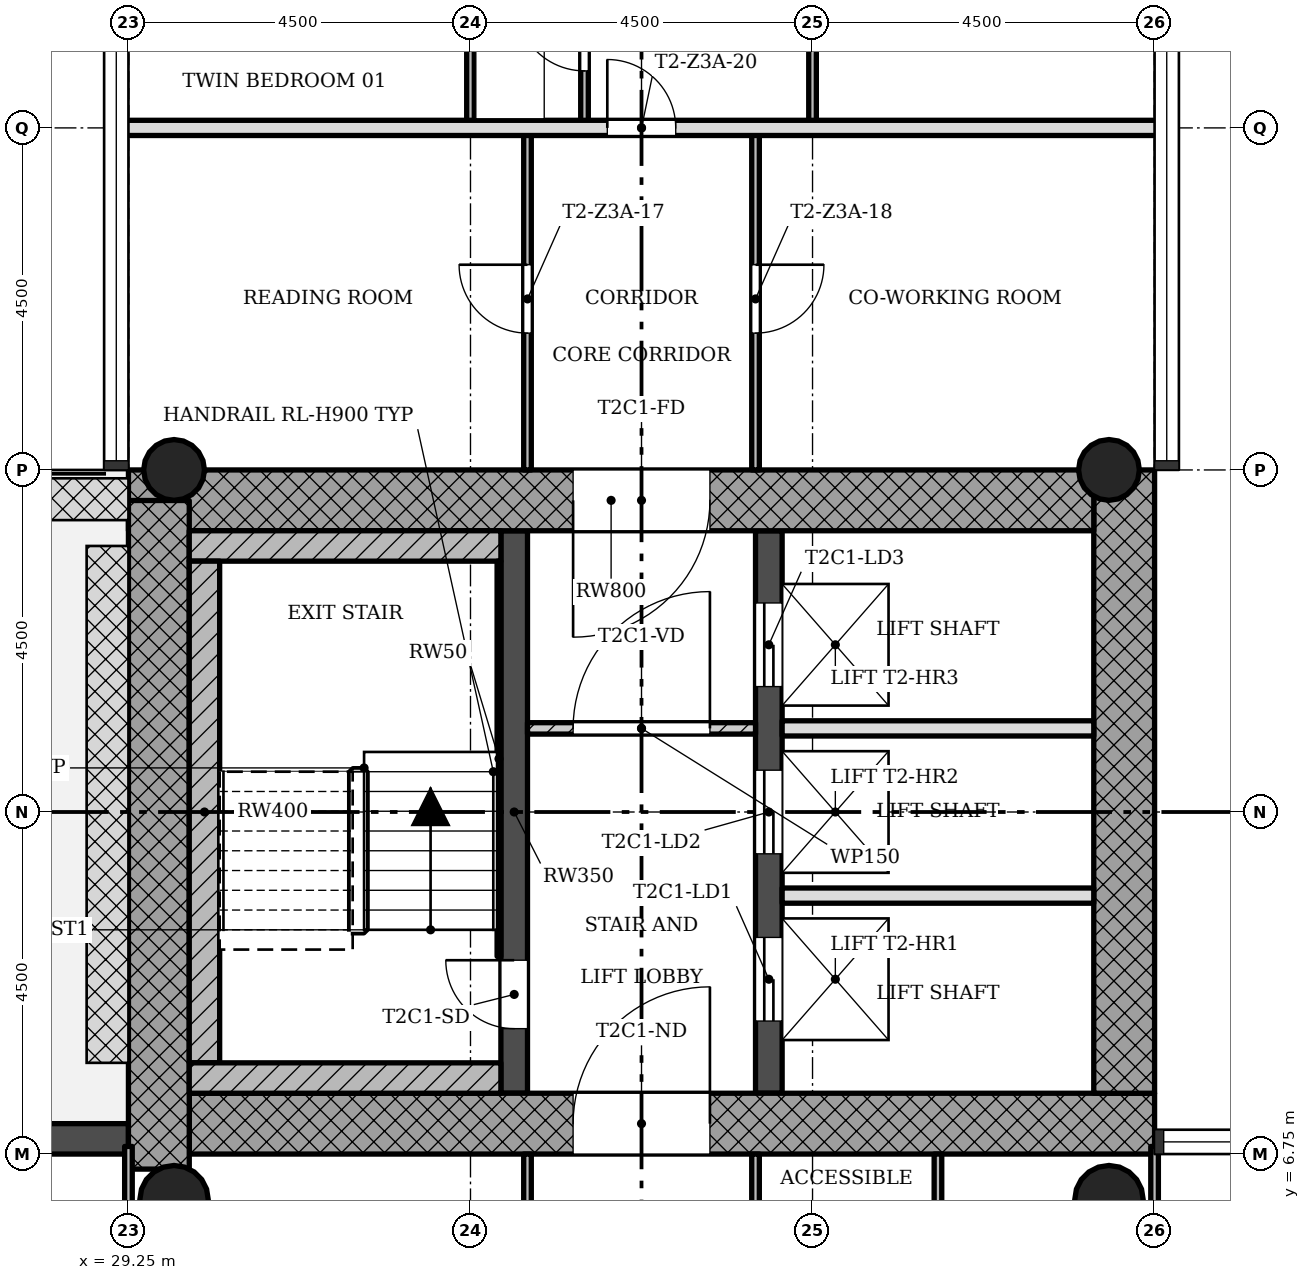
"""IFC4 building model, lengths in metres.
Left out: names, types, materials, properties, quantities, classifications, styles, units other than length and angle.
Written with IfcOpenShell. Run it as: python <this file> out.ifc"""

import sys

from ifc_helpers import new_model, si_unit, direction, frame, frame_2d, origin, origin_2d, place, context, subcontext, project, spatial, rectangle, hollow_circle, extrude, element, fill, save


model = new_model("IFC4")
c1 = context("Model", 3, precision=1e-05, world=origin(), true_north=direction((0.0, 1.0)))
c2 = subcontext(c1, "Body", "Model", "MODEL_VIEW")
j1 = project(units=[si_unit("LENGTHUNIT", "METRE"), si_unit("PLANEANGLEUNIT", "RADIAN")], contexts=[c1])
p1 = place(None, origin())
s1 = spatial("IfcSite", under=j1, at=p1, CompositionType="ELEMENT")
p2 = place(p1, origin())
s2 = spatial("IfcBuilding", under=s1, at=p2, CompositionType="ELEMENT")
p3 = place(p2, frame((0.0, 0.0, 140.5)))
s3 = spatial("IfcBuildingStorey", under=s2, at=p3, CompositionType="ELEMENT", Elevation=140.5)
p4 = place(p3, frame((30.05, 7.15, 0.0), z_axis=(0.0, 0.0, 1.0), x_axis=(1.0, 0.0, 0.0)))
e1 = element("IfcWall", 1, at=p4, inside=s3, PredefinedType="SHEAR", context=c2, shape_type="SweptSolid", body=[
    extrude(rectangle(XDim=12.7, YDim=0.8, at=frame_2d((6.35, 0.0))), origin(), (0.0, 0.0, 1.0), 3.4),
])
p5 = place(p4, frame((5.05, 0.0, 0.0)))
e2 = element("IfcOpeningElement", 2, at=p5, cuts=e1, PredefinedType="OPENING", context=c2, shape_type="SweptSolid", body=[
    extrude(rectangle(XDim=1.8, YDim=2.1, at=frame_2d((0.9, 1.05))), frame((0.0, 0.41, 0.0), z_axis=(0.0, -1.0, 0.0), x_axis=(1.0, 0.0, 0.0)), (0.0, 0.0, 1.0), 0.82),
])
p6 = place(p3, frame((42.35, 7.55, 0.0), z_axis=(0.0, 0.0, 1.0), x_axis=(0.0, 1.0, 0.0)))
e3 = element("IfcWall", 3, at=p6, inside=s3, PredefinedType="SHEAR", context=c2, shape_type="SweptSolid", body=[
    extrude(rectangle(XDim=8.2, YDim=0.8, at=frame_2d((4.1, 0.0))), origin(), (0.0, 0.0, 1.0), 3.4),
])
p7 = place(p3, frame((41.95, 15.35, 0.0), z_axis=(0.0, 0.0, 1.0), x_axis=(-1.0, 0.0, 0.0)))
e4 = element("IfcWall", 4, at=p7, inside=s3, PredefinedType="SHEAR", context=c2, shape_type="SweptSolid", body=[
    extrude(rectangle(XDim=12.7, YDim=0.8, at=frame_2d((6.35, 0.0))), origin(), (0.0, 0.0, 1.0), 3.4),
])
p8 = place(p7, frame((5.05, 0.0, 0.0)))
e5 = element("IfcOpeningElement", 5, at=p8, cuts=e4, PredefinedType="OPENING", context=c2, shape_type="SweptSolid", body=[
    extrude(rectangle(XDim=1.8, YDim=2.1, at=frame_2d((0.9, 1.05))), frame((0.0, 0.41, 0.0), z_axis=(0.0, -1.0, 0.0), x_axis=(1.0, 0.0, 0.0)), (0.0, 0.0, 1.0), 0.82),
])
p9 = place(p3, frame((29.65, 15.348, 0.0), z_axis=(0.0, 0.0, 1.0), x_axis=(0.0, -1.0, 0.0)))
e6 = element("IfcWall", 6, at=p9, inside=s3, PredefinedType="SHEAR", context=c2, shape_type="SweptSolid", body=[
    extrude(rectangle(XDim=8.796, YDim=0.8, at=frame_2d((4.398, 0.0))), origin(), (0.0, 0.0, 1.0), 3.4),
])
p10 = place(p3, frame((34.325, 7.55, 0.0), z_axis=(0.0, 0.0, 1.0), x_axis=(0.0, 1.0, 0.0)))
e7 = element("IfcWall", 7, at=p10, inside=s3, PredefinedType="SHEAR", context=c2, shape_type="SweptSolid", body=[
    extrude(rectangle(XDim=7.4, YDim=0.35, at=frame_2d((3.7, 0.0))), origin(), (0.0, 0.0, 1.0), 3.4),
])
p11 = place(p10, frame((0.85, 0.0, 0.0)))
e8 = element("IfcOpeningElement", 8, at=p11, cuts=e7, PredefinedType="OPENING", context=c2, shape_type="SweptSolid", body=[
    extrude(rectangle(XDim=0.9, YDim=2.1, at=frame_2d((0.45, 1.05))), frame((0.0, 0.185, 0.0), z_axis=(0.0, -1.0, 0.0), x_axis=(1.0, 0.0, 0.0)), (0.0, 0.0, 1.0), 0.37),
])
p12 = place(p3, frame((37.675, 7.55, 0.0), z_axis=(0.0, 0.0, 1.0), x_axis=(0.0, 1.0, 0.0)))
e9 = element("IfcWall", 9, at=p12, inside=s3, PredefinedType="SHEAR", context=c2, shape_type="SweptSolid", body=[
    extrude(rectangle(XDim=7.4, YDim=0.35, at=frame_2d((3.7, 0.0))), origin(), (0.0, 0.0, 1.0), 3.4),
])
p13 = place(p12, frame((0.95, 0.0, 0.0)))
e10 = element("IfcOpeningElement", 10, at=p13, cuts=e9, PredefinedType="OPENING", context=c2, shape_type="SweptSolid", body=[
    extrude(rectangle(XDim=1.1, YDim=2.1, at=frame_2d((0.55, 1.05))), frame((0.0, 0.185, 0.0), z_axis=(0.0, -1.0, 0.0), x_axis=(1.0, 0.0, 0.0)), (0.0, 0.0, 1.0), 0.37),
])
p14 = place(p12, frame((3.15, 0.0, 0.0)))
e11 = element("IfcOpeningElement", 11, at=p14, cuts=e9, PredefinedType="OPENING", context=c2, shape_type="SweptSolid", body=[
    extrude(rectangle(XDim=1.1, YDim=2.1, at=frame_2d((0.55, 1.05))), frame((0.0, 0.185, 0.0), z_axis=(0.0, -1.0, 0.0), x_axis=(1.0, 0.0, 0.0)), (0.0, 0.0, 1.0), 0.37),
])
p15 = place(p12, frame((5.35, 0.0, 0.0)))
e12 = element("IfcOpeningElement", 12, at=p15, cuts=e9, PredefinedType="OPENING", context=c2, shape_type="SweptSolid", body=[
    extrude(rectangle(XDim=1.1, YDim=2.1, at=frame_2d((0.55, 1.05))), frame((0.0, 0.185, 0.0), z_axis=(0.0, -1.0, 0.0), x_axis=(1.0, 0.0, 0.0)), (0.0, 0.0, 1.0), 0.37),
])
for number, where, z_axis, x_axis in (
    (13, (42.15, 15.75, 0.0), (0.0, 0.0, 1.0), (1.0, 0.0, 0.0)),
    (14, (29.85, 15.75, 0.0), (0.0, 0.0, 1.0), (1.0, 0.0, 0.0)),
):
    element("IfcColumn", number, at=place(p3, frame(where, z_axis=z_axis, x_axis=x_axis)), inside=s3, PredefinedType="COLUMN", context=c2, shape_type="SweptSolid", body=[
        extrude(hollow_circle(Radius=0.4, WallThickness=0.028, at=origin_2d()), origin(), (0.0, 0.0, 1.0), 3.4),
    ])
for number, where, z_axis, x_axis in (
    (15, (42.15, 6.15, 0.0), (0.0, 0.0, 1.0), (1.0, 0.0, 0.0)),
    (16, (29.85, 6.15, 0.0), (0.0, 0.0, 1.0), (1.0, 0.0, 0.0)),
):
    element("IfcColumn", number, at=place(p3, frame(where, z_axis=z_axis, x_axis=x_axis)), inside=s3, PredefinedType="COLUMN", context=c2, shape_type="SweptSolid", body=[
        extrude(hollow_circle(Radius=0.45, WallThickness=0.032, at=origin_2d()), origin(), (0.0, 0.0, 1.0), 3.4),
    ])
p16 = place(p3, frame((29.25, 6.95, -0.02), z_axis=(0.0, 0.0, 1.0), x_axis=(-1.0, 0.0, 0.0)))
e17 = element("IfcWall", 17, at=p16, inside=s3, PredefinedType="STANDARD", context=c2, shape_type="SweptSolid", body=[
    extrude(rectangle(XDim=4.5, YDim=0.4, at=frame_2d((2.25, 0.0))), origin(), (0.0, 0.0, 1.0), 3.12),
])
p17 = place(p16, frame((1.35, 0.0, 0.02)))
e18 = element("IfcOpeningElement", 18, at=p17, cuts=e17, PredefinedType="OPENING", context=c2, shape_type="SweptSolid", body=[
    extrude(rectangle(XDim=1.8, YDim=2.1, at=frame_2d((0.9, 1.05))), frame((0.0, 0.21, 0.0), z_axis=(0.0, -1.0, 0.0), x_axis=(1.0, 0.0, 0.0)), (0.0, 0.0, 1.0), 0.42),
])
p18 = place(p3, frame((37.5, 12.35, 0.0), z_axis=(0.0, 0.0, 1.0), x_axis=(-1.0, 0.0, 0.0)))
e19 = element("IfcWall", 19, at=p18, inside=s3, PredefinedType="PARTITIONING", context=c2, shape_type="SweptSolid", body=[
    extrude(rectangle(XDim=3.0, YDim=0.15, at=frame_2d((1.5, 0.0))), origin(), (0.0, 0.0, 1.0), 3.0),
])
p19 = place(p18, frame((0.6, 0.0, 0.0)))
e20 = element("IfcOpeningElement", 20, at=p19, cuts=e19, PredefinedType="OPENING", context=c2, shape_type="SweptSolid", body=[
    extrude(rectangle(XDim=1.8, YDim=2.1, at=frame_2d((0.9, 1.05))), frame((0.0, 0.085, 0.0), z_axis=(0.0, -1.0, 0.0), x_axis=(1.0, 0.0, 0.0)), (0.0, 0.0, 1.0), 0.17),
])
for number, where, z_axis, x_axis in (
    (21, (41.95, 10.15, 0.0), (0.0, 0.0, 1.0), (-1.0, 0.0, 0.0)),
    (22, (41.95, 12.35, 0.0), (0.0, 0.0, 1.0), (-1.0, 0.0, 0.0)),
):
    element("IfcWall", number, at=place(p3, frame(where, z_axis=z_axis, x_axis=x_axis)), inside=s3, PredefinedType="SOLIDWALL", context=c2, shape_type="SweptSolid", body=[
        extrude(rectangle(XDim=4.1, YDim=0.2, at=frame_2d((2.05, 0.0))), origin(), (0.0, 0.0, 1.0), 3.0),
    ])
p20 = place(p3, frame((42.85, 20.25, 0.0), z_axis=(0.0, 0.0, 1.0), x_axis=(-1.0, 0.0, 0.0)))
e23 = element("IfcWall", 23, at=p20, inside=s3, PredefinedType="SOLIDWALL", context=c2, shape_type="SweptSolid", body=[
    extrude(rectangle(XDim=13.7, YDim=0.2, at=frame_2d((6.85, 0.0))), origin(), (0.0, 0.0, 1.0), 3.0),
])
p21 = place(p20, frame((6.4, 0.0, 0.0)))
e24 = element("IfcOpeningElement", 24, at=p21, cuts=e23, PredefinedType="OPENING", context=c2, shape_type="SweptSolid", body=[
    extrude(rectangle(XDim=0.9, YDim=2.1, at=frame_2d((0.45, 1.05))), frame((0.0, 0.11, 0.0), z_axis=(0.0, -1.0, 0.0), x_axis=(1.0, 0.0, 0.0)), (0.0, 0.0, 1.0), 0.22),
])
p22 = place(p3, frame((42.75, 0.9, 0.0), z_axis=(0.0, 0.0, 1.0), x_axis=(0.0, 1.0, 0.0)))
e25 = element("IfcWall", 25, at=p22, inside=s3, PredefinedType="PARTITIONING", context=c2, shape_type="SweptSolid", body=[
    extrude(rectangle(XDim=5.95, YDim=0.1, at=frame_2d((2.975, 0.0))), origin(), (0.0, 0.0, 1.0), 3.0),
])
p23 = place(p3, frame((39.9, 4.5, 0.0), z_axis=(0.0, 0.0, 1.0), x_axis=(0.0, 1.0, 0.0)))
e26 = element("IfcWall", 26, at=p23, inside=s3, PredefinedType="PARTITIONING", context=c2, shape_type="SweptSolid", body=[
    extrude(rectangle(XDim=2.25, YDim=0.1, at=frame_2d((1.125, 0.0))), origin(), (0.0, 0.0, 1.0), 3.0),
])
p24 = place(p3, frame((38.25, 20.25, 0.0), z_axis=(0.0, 0.0, 1.0), x_axis=(0.0, 1.0, 0.0)))
e27 = element("IfcWall", 27, at=p24, inside=s3, PredefinedType="PARTITIONING", context=c2, shape_type="SweptSolid", body=[
    extrude(rectangle(XDim=4.6, YDim=0.1, at=frame_2d((2.3, 0.0))), origin(), (0.0, 0.0, 1.0), 3.0),
])
p25 = place(p24, frame((1.8, 0.0, 0.0)))
e28 = element("IfcOpeningElement", 28, at=p25, cuts=e27, PredefinedType="OPENING", context=c2, shape_type="SweptSolid", body=[
    extrude(rectangle(XDim=0.9, YDim=2.1, at=frame_2d((0.45, 1.05))), frame((0.0, 0.06, 0.0), z_axis=(0.0, -1.0, 0.0), x_axis=(1.0, 0.0, 0.0)), (0.0, 0.0, 1.0), 0.12),
])
p26 = place(p3, frame((37.5, 4.5, 0.0), z_axis=(0.0, 0.0, 1.0), x_axis=(0.0, 1.0, 0.0)))
e29 = element("IfcWall", 29, at=p26, inside=s3, PredefinedType="PARTITIONING", context=c2, shape_type="SweptSolid", body=[
    extrude(rectangle(XDim=2.25, YDim=0.1, at=frame_2d((1.125, 0.0))), origin(), (0.0, 0.0, 1.0), 3.0),
])
p27 = place(p26, frame((0.675, 0.0, 0.0)))
e30 = element("IfcOpeningElement", 30, at=p27, cuts=e29, PredefinedType="OPENING", context=c2, shape_type="SweptSolid", body=[
    extrude(rectangle(XDim=0.9, YDim=2.1, at=frame_2d((0.45, 1.05))), frame((0.0, 0.06, 0.0), z_axis=(0.0, -1.0, 0.0), x_axis=(1.0, 0.0, 0.0)), (0.0, 0.0, 1.0), 0.12),
])
p28 = place(p3, frame((37.5, 15.75, 0.0), z_axis=(0.0, 0.0, 1.0), x_axis=(0.0, 1.0, 0.0)))
e31 = element("IfcWall", 31, at=p28, inside=s3, PredefinedType="PARTITIONING", context=c2, shape_type="SweptSolid", body=[
    extrude(rectangle(XDim=4.5, YDim=0.1, at=frame_2d((2.25, 0.0))), origin(), (0.0, 0.0, 1.0), 3.0),
])
p29 = place(p28, frame((1.8, 0.0, 0.0)))
e32 = element("IfcOpeningElement", 32, at=p29, cuts=e31, PredefinedType="OPENING", context=c2, shape_type="SweptSolid", body=[
    extrude(rectangle(XDim=0.9, YDim=2.1, at=frame_2d((0.45, 1.05))), frame((0.0, 0.06, 0.0), z_axis=(0.0, -1.0, 0.0), x_axis=(1.0, 0.0, 0.0)), (0.0, 0.0, 1.0), 0.12),
])
p30 = place(p3, frame((35.25, 20.25, 0.0), z_axis=(0.0, 0.0, 1.0), x_axis=(0.0, 1.0, 0.0)))
e33 = element("IfcWall", 33, at=p30, inside=s3, PredefinedType="PARTITIONING", context=c2, shape_type="SweptSolid", body=[
    extrude(rectangle(XDim=2.4, YDim=0.1, at=frame_2d((1.2, 0.0))), origin(), (0.0, 0.0, 1.0), 3.0),
])
p31 = place(p30, frame((0.75, 0.0, 0.0)))
e34 = element("IfcOpeningElement", 34, at=p31, cuts=e33, PredefinedType="OPENING", context=c2, shape_type="SweptSolid", body=[
    extrude(rectangle(XDim=0.9, YDim=2.1, at=frame_2d((0.45, 1.05))), frame((0.0, 0.06, 0.0), z_axis=(0.0, -1.0, 0.0), x_axis=(1.0, 0.0, 0.0)), (0.0, 0.0, 1.0), 0.12),
])
p32 = place(p3, frame((34.5, 4.5, 0.0), z_axis=(0.0, 0.0, 1.0), x_axis=(0.0, 1.0, 0.0)))
e35 = element("IfcWall", 35, at=p32, inside=s3, PredefinedType="PARTITIONING", context=c2, shape_type="SweptSolid", body=[
    extrude(rectangle(XDim=2.25, YDim=0.1, at=frame_2d((1.125, 0.0))), origin(), (0.0, 0.0, 1.0), 3.0),
])
p33 = place(p3, frame((34.5, 15.75, 0.0), z_axis=(0.0, 0.0, 1.0), x_axis=(0.0, 1.0, 0.0)))
e36 = element("IfcWall", 36, at=p33, inside=s3, PredefinedType="PARTITIONING", context=c2, shape_type="SweptSolid", body=[
    extrude(rectangle(XDim=4.5, YDim=0.1, at=frame_2d((2.25, 0.0))), origin(), (0.0, 0.0, 1.0), 3.0),
])
p34 = place(p33, frame((1.8, 0.0, 0.0)))
e37 = element("IfcOpeningElement", 37, at=p34, cuts=e36, PredefinedType="OPENING", context=c2, shape_type="SweptSolid", body=[
    extrude(rectangle(XDim=0.9, YDim=2.1, at=frame_2d((0.45, 1.05))), frame((0.0, 0.06, 0.0), z_axis=(0.0, -1.0, 0.0), x_axis=(1.0, 0.0, 0.0)), (0.0, 0.0, 1.0), 0.12),
])
p35 = place(p3, frame((33.75, 20.25, 0.0), z_axis=(0.0, 0.0, 1.0), x_axis=(0.0, 1.0, 0.0)))
e38 = element("IfcWall", 38, at=p35, inside=s3, PredefinedType="PARTITIONING", context=c2, shape_type="SweptSolid", body=[
    extrude(rectangle(XDim=4.6, YDim=0.1, at=frame_2d((2.3, 0.0))), origin(), (0.0, 0.0, 1.0), 3.0),
])
p36 = place(p35, frame((2.45, 0.0, 0.0)))
e39 = element("IfcOpeningElement", 39, at=p36, cuts=e38, PredefinedType="OPENING", context=c2, shape_type="SweptSolid", body=[
    extrude(rectangle(XDim=0.9, YDim=2.1, at=frame_2d((0.45, 1.05))), frame((0.0, 0.06, 0.0), z_axis=(0.0, -1.0, 0.0), x_axis=(1.0, 0.0, 0.0)), (0.0, 0.0, 1.0), 0.12),
])
p37 = place(p3, frame((29.25, 0.9, 0.0), z_axis=(0.0, 0.0, 1.0), x_axis=(0.0, 1.0, 0.0)))
e40 = element("IfcWall", 40, at=p37, inside=s3, PredefinedType="PARTITIONING", context=c2, shape_type="SweptSolid", body=[
    extrude(rectangle(XDim=5.95, YDim=0.1, at=frame_2d((2.975, 0.0))), origin(), (0.0, 0.0, 1.0), 3.0),
])
p38 = place(p3, frame((34.15, 14.75, 0.0), z_axis=(0.0, 0.0, 1.0), x_axis=(-1.0, 0.0, 0.0)))
e41 = element("IfcWall", 41, at=p38, inside=s3, PredefinedType="SHEAR", context=c2, shape_type="SweptSolid", body=[
    extrude(rectangle(XDim=4.1, YDim=0.4, at=frame_2d((2.05, 0.0))), origin(), (0.0, 0.0, 1.0), 3.4),
])
p39 = place(p3, frame((30.25, 7.95, 0.0), z_axis=(0.0, 0.0, 1.0), x_axis=(0.0, 1.0, 0.0)))
e42 = element("IfcWall", 42, at=p39, inside=s3, PredefinedType="SHEAR", context=c2, shape_type="SweptSolid", body=[
    extrude(rectangle(XDim=6.6, YDim=0.4, at=frame_2d((3.3, 0.0))), origin(), (0.0, 0.0, 1.0), 3.4),
])
p40 = place(p3, frame((34.15, 7.75, 0.0), z_axis=(0.0, 0.0, 1.0), x_axis=(-1.0, 0.0, 0.0)))
e43 = element("IfcWall", 43, at=p40, inside=s3, PredefinedType="SHEAR", context=c2, shape_type="SweptSolid", body=[
    extrude(rectangle(XDim=4.1, YDim=0.4, at=frame_2d((2.05, 0.0))), origin(), (0.0, 0.0, 1.0), 3.4),
])
p41 = place(p3, frame((34.125, 9.35, 0.0), z_axis=(0.0, 0.0, 1.0), x_axis=(0.0, 1.0, 0.0)))
e44 = element("IfcWall", 44, at=p41, inside=s3, PredefinedType="SHEAR", context=c2, shape_type="SweptSolid", body=[
    extrude(rectangle(XDim=5.2, YDim=0.05, at=frame_2d((2.6, 0.0))), origin(), (0.0, 0.0, 1.0), 3.4),
])
p42 = place(p19, origin())
e45 = element("IfcDoor", 45, at=p42, inside=s3, OperationType="SINGLE_SWING_LEFT", PredefinedType="DOOR", context=c2, shape_type="SweptSolid", body=[
    extrude(rectangle(XDim=1.8, YDim=2.1, at=frame_2d((0.9, 1.05))), frame((0.0, 0.025, 0.0), z_axis=(0.0, -1.0, 0.0), x_axis=(1.0, 0.0, 0.0)), (0.0, 0.0, 1.0), 0.05),
])
fill(e20, e45)
p43 = place(p34, origin())
e46 = element("IfcDoor", 46, at=p43, inside=s3, OperationType="SINGLE_SWING_LEFT", PredefinedType="DOOR", context=c2, shape_type="SweptSolid", body=[
    extrude(rectangle(XDim=0.9, YDim=2.1, at=frame_2d((0.45, 1.05))), frame((0.0, 0.025, 0.0), z_axis=(0.0, -1.0, 0.0), x_axis=(1.0, 0.0, 0.0)), (0.0, 0.0, 1.0), 0.05),
])
fill(e37, e46)
p44 = place(p29, origin())
e47 = element("IfcDoor", 47, at=p44, inside=s3, OperationType="SINGLE_SWING_RIGHT", PredefinedType="DOOR", context=c2, shape_type="SweptSolid", body=[
    extrude(rectangle(XDim=0.9, YDim=2.1, at=frame_2d((0.45, 1.05))), frame((0.0, 0.025, 0.0), z_axis=(0.0, -1.0, 0.0), x_axis=(1.0, 0.0, 0.0)), (0.0, 0.0, 1.0), 0.05),
])
fill(e32, e47)
p45 = place(p31, origin())
e48 = element("IfcDoor", 48, at=p45, inside=s3, OperationType="SINGLE_SWING_LEFT", PredefinedType="DOOR", context=c2, shape_type="SweptSolid", body=[
    extrude(rectangle(XDim=0.9, YDim=2.1, at=frame_2d((0.45, 1.05))), frame((0.0, 0.025, 0.0), z_axis=(0.0, -1.0, 0.0), x_axis=(1.0, 0.0, 0.0)), (0.0, 0.0, 1.0), 0.05),
])
fill(e34, e48)
p46 = place(p21, origin())
e49 = element("IfcDoor", 49, at=p46, inside=s3, OperationType="SINGLE_SWING_RIGHT", PredefinedType="DOOR", context=c2, shape_type="SweptSolid", body=[
    extrude(rectangle(XDim=0.9, YDim=2.1, at=frame_2d((0.45, 1.05))), frame((0.0, 0.025, 0.0), z_axis=(0.0, -1.0, 0.0), x_axis=(1.0, 0.0, 0.0)), (0.0, 0.0, 1.0), 0.05),
])
fill(e24, e49)
p47 = place(p11, origin())
e50 = element("IfcDoor", 50, at=p47, inside=s3, OperationType="SINGLE_SWING_LEFT", PredefinedType="DOOR", context=c2, shape_type="SweptSolid", body=[
    extrude(rectangle(XDim=0.9, YDim=2.1, at=frame_2d((0.45, 1.05))), frame((0.0, 0.025, 0.0), z_axis=(0.0, -1.0, 0.0), x_axis=(1.0, 0.0, 0.0)), (0.0, 0.0, 1.0), 0.05),
])
fill(e8, e50)
p48 = place(p13, origin())
e51 = element("IfcDoor", 51, at=p48, inside=s3, OperationType="SLIDING_TO_LEFT", PredefinedType="DOOR", context=c2, shape_type="SweptSolid", body=[
    extrude(rectangle(XDim=1.1, YDim=2.1, at=frame_2d((0.55, 1.05))), frame((0.0, 0.025, 0.0), z_axis=(0.0, -1.0, 0.0), x_axis=(1.0, 0.0, 0.0)), (0.0, 0.0, 1.0), 0.05),
])
fill(e10, e51)
p49 = place(p14, origin())
e52 = element("IfcDoor", 52, at=p49, inside=s3, OperationType="SLIDING_TO_LEFT", PredefinedType="DOOR", context=c2, shape_type="SweptSolid", body=[
    extrude(rectangle(XDim=1.1, YDim=2.1, at=frame_2d((0.55, 1.05))), frame((0.0, 0.025, 0.0), z_axis=(0.0, -1.0, 0.0), x_axis=(1.0, 0.0, 0.0)), (0.0, 0.0, 1.0), 0.05),
])
fill(e11, e52)
p50 = place(p15, origin())
e53 = element("IfcDoor", 53, at=p50, inside=s3, OperationType="SLIDING_TO_LEFT", PredefinedType="DOOR", context=c2, shape_type="SweptSolid", body=[
    extrude(rectangle(XDim=1.1, YDim=2.1, at=frame_2d((0.55, 1.05))), frame((0.0, 0.025, 0.0), z_axis=(0.0, -1.0, 0.0), x_axis=(1.0, 0.0, 0.0)), (0.0, 0.0, 1.0), 0.05),
])
fill(e12, e53)
p51 = place(p5, origin())
e54 = element("IfcDoor", 54, at=p51, inside=s3, OperationType="SINGLE_SWING_LEFT", PredefinedType="DOOR", context=c2, shape_type="SweptSolid", body=[
    extrude(rectangle(XDim=1.8, YDim=2.1, at=frame_2d((0.9, 1.05))), frame((0.0, 0.025, 0.0), z_axis=(0.0, -1.0, 0.0), x_axis=(1.0, 0.0, 0.0)), (0.0, 0.0, 1.0), 0.05),
])
fill(e2, e54)
p52 = place(p8, origin())
e55 = element("IfcDoor", 55, at=p52, inside=s3, OperationType="SINGLE_SWING_LEFT", PredefinedType="DOOR", context=c2, shape_type="SweptSolid", body=[
    extrude(rectangle(XDim=1.8, YDim=2.1, at=frame_2d((0.9, 1.05))), frame((0.0, 0.025, 0.0), z_axis=(0.0, -1.0, 0.0), x_axis=(1.0, 0.0, 0.0)), (0.0, 0.0, 1.0), 0.05),
])
fill(e5, e55)
save(model, sys.argv[1])
